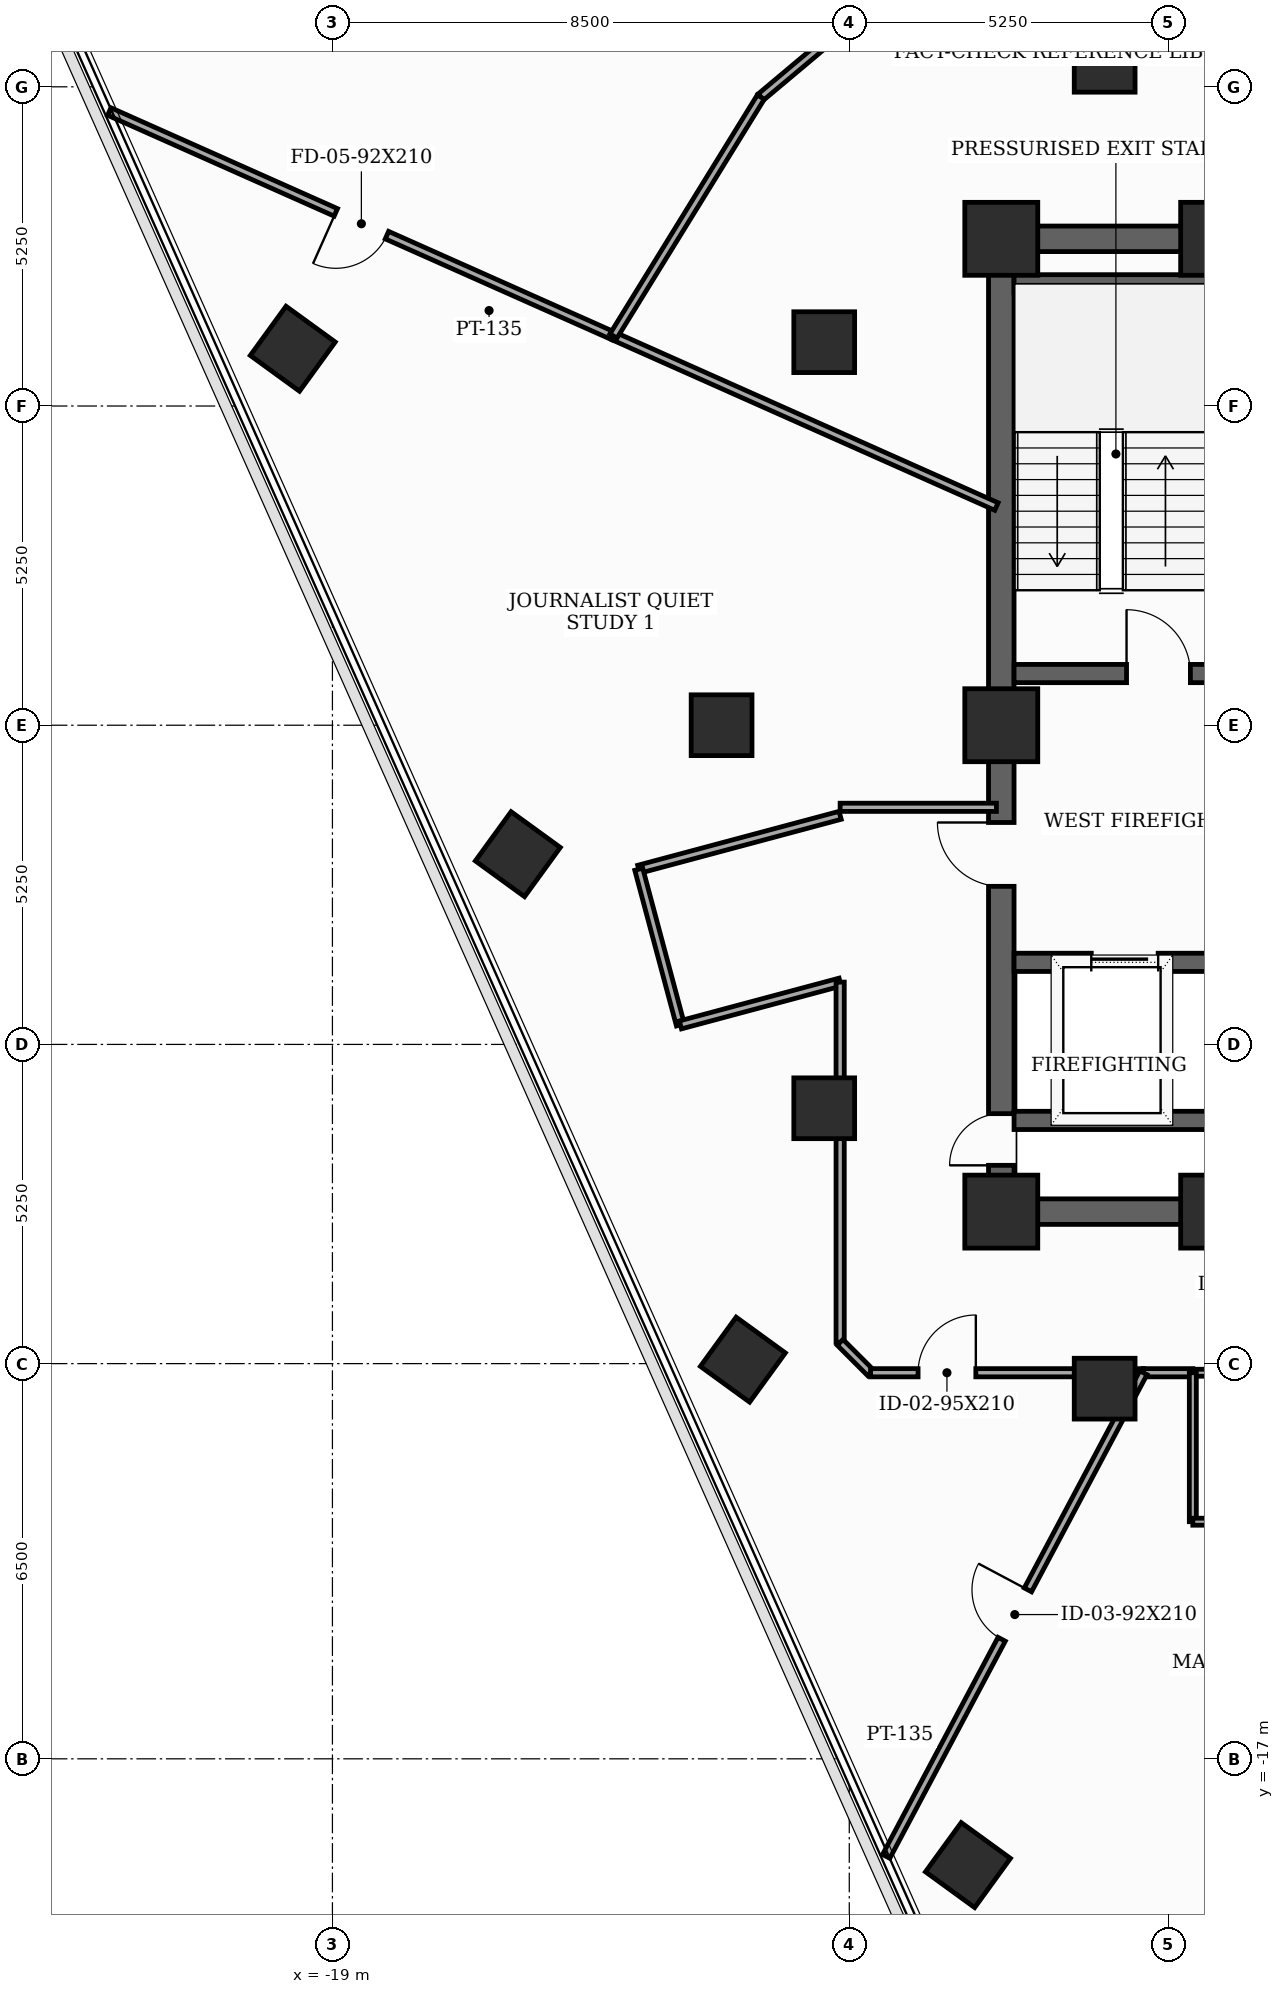
"""IFC4 building model, lengths in metres.
Left out: names, types, materials, properties, quantities, classifications, styles, units other than length and angle.
Written with IfcOpenShell. Run it as: python <this file> out.ifc"""

import sys

from ifc_helpers import new_model, si_unit, direction, frame, frame_2d, origin, origin_2d, place, context, subcontext, project, spatial, rectangle, extrude, element, fill, save


model = new_model("IFC4")
c1 = context("Model", 3, precision=1e-05, world=origin(), true_north=direction((0.0, 1.0)))
c2 = subcontext(c1, "Body", "Model", "MODEL_VIEW")
j1 = project(units=[si_unit("LENGTHUNIT", "METRE"), si_unit("PLANEANGLEUNIT", "RADIAN")], contexts=[c1])
p1 = place(None, origin())
s1 = spatial("IfcSite", under=j1, at=p1, CompositionType="ELEMENT")
p2 = place(p1, origin())
s2 = spatial("IfcBuilding", under=s1, at=p2, CompositionType="ELEMENT")
p3 = place(p2, frame((0.0, 0.0, 233.7)))
s3 = spatial("IfcBuildingStorey", under=s2, at=p3, CompositionType="ELEMENT", Elevation=233.7)
for number, where, z_axis, x_axis in (
    (1, (-8.0, -8.0, 0.0), (0.0, 0.0, 1.0), (1.0, 0.0, 0.0)),
    (2, (-4.45, -8.0, 0.0), (0.0, 0.0, 1.0), (1.0, 0.0, 0.0)),
    (3, (-4.45, 8.0, 0.0), (0.0, 0.0, 1.0), (1.0, 0.0, 0.0)),
    (4, (-8.0, 8.0, 0.0), (0.0, 0.0, 1.0), (1.0, 0.0, 0.0)),
    (5, (-8.0, 0.0, 0.0), (0.0, 0.0, 1.0), (1.0, 0.0, 0.0)),
):
    element("IfcColumn", number, at=place(p3, frame(where, z_axis=z_axis, x_axis=x_axis)), inside=s3, PredefinedType="COLUMN", context=c2, shape_type="SweptSolid", body=[
        extrude(rectangle(XDim=1.2, YDim=1.2, at=origin_2d()), origin(), (0.0, 0.0, 1.0), 3.7),
    ])
for number, where, z_axis, x_axis in (
    (6, (-6.3, 10.912, 0.0), (0.0, 0.0, 1.0), (1.0, 0.0, 0.0)),
    (7, (-10.912, 6.3, 0.0), (0.0, 0.0, 1.0), (1.0, 0.0, 0.0)),
    (8, (-12.6, 0.0, 0.0), (0.0, 0.0, 1.0), (1.0, 0.0, 0.0)),
    (9, (-10.912, -6.3, 0.0), (0.0, 0.0, 1.0), (1.0, 0.0, 0.0)),
    (10, (-6.3, -10.912, 0.0), (0.0, 0.0, 1.0), (1.0, 0.0, 0.0)),
    (11, (-19.652, 6.192, 0.0), (0.0, 0.0, 1.0), (0.588, 0.809, 0.0)),
    (12, (-15.951, -2.121, 0.0), (0.0, 0.0, 1.0), (0.588, 0.809, 0.0)),
    (13, (-12.25, -10.435, 0.0), (0.0, 0.0, 1.0), (0.588, 0.809, 0.0)),
    (14, (-8.548, -18.748, 0.0), (0.0, 0.0, 1.0), (0.588, 0.809, 0.0)),
):
    element("IfcColumn", number, at=place(p3, frame(where, z_axis=z_axis, x_axis=x_axis)), inside=s3, PredefinedType="COLUMN", context=c2, shape_type="SweptSolid", body=[
        extrude(rectangle(XDim=1.0, YDim=1.0, at=origin_2d()), origin(), (0.0, 0.0, 1.0), 3.7),
    ])
p4 = place(p3, frame((-8.0, -8.0, 0.0), z_axis=(0.0, 0.0, 1.0), x_axis=(0.0, 1.0, 0.0)))
e15 = element("IfcWall", 15, at=p4, inside=s3, PredefinedType="SHEAR", context=c2, shape_type="SweptSolid", body=[
    extrude(rectangle(XDim=16.0, YDim=0.42, at=frame_2d((8.0, 0.0))), origin(), (0.0, 0.0, 1.0), 3.5),
])
p5 = place(p4, frame((0.761, 0.0, 0.0)))
e16 = element("IfcOpeningElement", 16, at=p5, cuts=e15, PredefinedType="OPENING", context=c2, shape_type="SweptSolid", body=[
    extrude(rectangle(XDim=0.85, YDim=2.02, at=frame_2d((0.425, 1.01))), frame((0.0, 0.22, 0.0), z_axis=(0.0, -1.0, 0.0), x_axis=(1.0, 0.0, 0.0)), (0.0, 0.0, 1.0), 0.44),
])
p6 = place(p4, frame((5.35, 0.0, 0.0)))
e17 = element("IfcOpeningElement", 17, at=p6, cuts=e15, PredefinedType="OPENING", context=c2, shape_type="SweptSolid", body=[
    extrude(rectangle(XDim=1.05, YDim=2.15, at=frame_2d((0.525, 1.075))), frame((0.0, 0.22, 0.0), z_axis=(0.0, -1.0, 0.0), x_axis=(1.0, 0.0, 0.0)), (0.0, 0.0, 1.0), 0.44),
])
p7 = place(p3, frame((-8.0, -8.0, 0.0), z_axis=(0.0, 0.0, 1.0), x_axis=(1.0, 0.0, 0.0)))
e18 = element("IfcWall", 18, at=p7, inside=s3, PredefinedType="SHEAR", context=c2, shape_type="SweptSolid", body=[
    extrude(rectangle(XDim=16.0, YDim=0.42, at=frame_2d((8.0, 0.0))), origin(), (0.0, 0.0, 1.0), 3.5),
])
p8 = place(p7, frame((4.6, 0.0, 0.0)))
e19 = element("IfcOpeningElement", 19, at=p8, cuts=e18, PredefinedType="OPENING", context=c2, shape_type="SweptSolid", body=[
    extrude(rectangle(XDim=0.95, YDim=2.1, at=frame_2d((0.475, 1.05))), frame((0.0, 0.22, 0.0), z_axis=(0.0, -1.0, 0.0), x_axis=(1.0, 0.0, 0.0)), (0.0, 0.0, 1.0), 0.44),
])
p9 = place(p7, frame((7.52, 0.0, 0.0)))
e20 = element("IfcOpeningElement", 20, at=p9, cuts=e18, PredefinedType="OPENING", context=c2, shape_type="SweptSolid", body=[
    extrude(rectangle(XDim=0.95, YDim=2.1, at=frame_2d((0.475, 1.05))), frame((0.0, 0.22, 0.0), z_axis=(0.0, -1.0, 0.0), x_axis=(1.0, 0.0, 0.0)), (0.0, 0.0, 1.0), 0.44),
])
p10 = place(p7, frame((10.45, 0.0, 0.0)))
e21 = element("IfcOpeningElement", 21, at=p10, cuts=e18, PredefinedType="OPENING", context=c2, shape_type="SweptSolid", body=[
    extrude(rectangle(XDim=0.95, YDim=2.1, at=frame_2d((0.475, 1.05))), frame((0.0, 0.22, 0.0), z_axis=(0.0, -1.0, 0.0), x_axis=(1.0, 0.0, 0.0)), (0.0, 0.0, 1.0), 0.44),
])
p11 = place(p3, frame((-8.0, 8.0, 0.0), z_axis=(0.0, 0.0, 1.0), x_axis=(1.0, 0.0, 0.0)))
e22 = element("IfcWall", 22, at=p11, inside=s3, PredefinedType="SHEAR", context=c2, shape_type="SweptSolid", body=[
    extrude(rectangle(XDim=16.0, YDim=0.42, at=frame_2d((8.0, 0.0))), origin(), (0.0, 0.0, 1.0), 3.5),
])
p12 = place(p11, frame((7.1, 0.0, 0.0)))
e23 = element("IfcOpeningElement", 23, at=p12, cuts=e22, PredefinedType="OPENING", context=c2, shape_type="SweptSolid", body=[
    extrude(rectangle(XDim=1.8, YDim=2.15, at=frame_2d((0.9, 1.075))), frame((0.0, 0.22, 0.0), z_axis=(0.0, -1.0, 0.0), x_axis=(1.0, 0.0, 0.0)), (0.0, 0.0, 1.0), 0.44),
])
p13 = place(p3, frame((-7.79, 0.85, 0.0), z_axis=(0.0, 0.0, 1.0), x_axis=(1.0, 0.0, 0.0)))
e24 = element("IfcWall", 24, at=p13, inside=s3, PredefinedType="SHEAR", context=c2, shape_type="SweptSolid", body=[
    extrude(rectangle(XDim=3.34, YDim=0.3, at=frame_2d((1.67, 0.0))), origin(), (0.0, 0.0, 1.0), 3.5),
])
p14 = place(p13, frame((1.85, 0.0, 0.0)))
e25 = element("IfcOpeningElement", 25, at=p14, cuts=e24, PredefinedType="OPENING", context=c2, shape_type="SweptSolid", body=[
    extrude(rectangle(XDim=1.05, YDim=2.15, at=frame_2d((0.525, 1.075))), frame((0.0, 0.16, 0.0), z_axis=(0.0, -1.0, 0.0), x_axis=(1.0, 0.0, 0.0)), (0.0, 0.0, 1.0), 0.32),
])
p15 = place(p3, frame((-7.79, 7.26, 0.0), z_axis=(0.0, 0.0, 1.0), x_axis=(1.0, 0.0, 0.0)))
e26 = element("IfcWall", 26, at=p15, inside=s3, PredefinedType="SHEAR", context=c2, shape_type="SweptSolid", body=[
    extrude(rectangle(XDim=3.34, YDim=0.3, at=frame_2d((1.67, 0.0))), origin(), (0.0, 0.0, 1.0), 3.5),
])
p16 = place(p3, frame((-7.79, -3.9, 0.0), z_axis=(0.0, 0.0, 1.0), x_axis=(1.0, 0.0, 0.0)))
e27 = element("IfcWall", 27, at=p16, inside=s3, PredefinedType="SHEAR", context=c2, shape_type="SweptSolid", body=[
    extrude(rectangle(XDim=3.34, YDim=0.3, at=frame_2d((1.67, 0.0))), origin(), (0.0, 0.0, 1.0), 3.5),
])
p17 = place(p16, frame((1.27, 0.0, 0.0)))
e28 = element("IfcOpeningElement", 28, at=p17, cuts=e27, PredefinedType="OPENING", context=c2, shape_type="SweptSolid", body=[
    extrude(rectangle(XDim=1.1, YDim=2.1, at=frame_2d((0.55, 1.05))), frame((0.0, 0.16, 0.0), z_axis=(0.0, -1.0, 0.0), x_axis=(1.0, 0.0, 0.0)), (0.0, 0.0, 1.0), 0.32),
])
p18 = place(p3, frame((-7.79, -6.5, 0.0), z_axis=(0.0, 0.0, 1.0), x_axis=(1.0, 0.0, 0.0)))
e29 = element("IfcWall", 29, at=p18, inside=s3, PredefinedType="SHEAR", context=c2, shape_type="SweptSolid", body=[
    extrude(rectangle(XDim=3.34, YDim=0.3, at=frame_2d((1.67, 0.0))), origin(), (0.0, 0.0, 1.0), 3.5),
])
p19 = place(p3, frame((-8.08, -1.35, 0.0), z_axis=(0.0, 0.0, 1.0), x_axis=(-1.0, 0.0, 0.0)))
e30 = element("IfcWall", 30, at=p19, inside=s3, PredefinedType="PARTITIONING", context=c2, shape_type="SweptSolid", body=[
    extrude(rectangle(XDim=2.57, YDim=0.135, at=frame_2d((1.285, 0.0))), origin(), (0.0, 0.0, 1.0), 2.885),
])
p20 = place(p3, frame((-10.65, -1.482, 0.0), z_axis=(0.0, 0.0, 1.0), x_axis=(-0.965961397105, -0.2586862565, 0.0)))
e31 = element("IfcWall", 31, at=p20, inside=s3, PredefinedType="PARTITIONING", context=c2, shape_type="SweptSolid", body=[
    extrude(rectangle(XDim=3.429, YDim=0.135, at=frame_2d((1.714, 0.0))), origin(), (0.0, 0.0, 1.0), 2.885),
])
p21 = place(p3, frame((-13.962, -2.369, 0.0), z_axis=(0.0, 0.0, 1.0), x_axis=(0.258413725385, -0.966034340245, 0.0)))
e32 = element("IfcWall", 32, at=p21, inside=s3, PredefinedType="PARTITIONING", context=c2, shape_type="SweptSolid", body=[
    extrude(rectangle(XDim=2.65, YDim=0.135, at=frame_2d((1.325, 0.0))), origin(), (0.0, 0.0, 1.0), 3.5),
])
p22 = place(p3, frame((-13.277, -4.929, 0.0), z_axis=(0.0, 0.0, 1.0), x_axis=(0.965934830229, 0.258785439601, 0.0)))
e33 = element("IfcWall", 33, at=p22, inside=s3, PredefinedType="PARTITIONING", context=c2, shape_type="SweptSolid", body=[
    extrude(rectangle(XDim=2.72, YDim=0.135, at=frame_2d((1.36, 0.0))), origin(), (0.0, 0.0, 1.0), 2.885),
])
p23 = place(p3, frame((-10.65, -4.225, 0.0), z_axis=(0.0, 0.0, 1.0), x_axis=(0.0, -1.0, 0.0)))
e34 = element("IfcWall", 34, at=p23, inside=s3, PredefinedType="PARTITIONING", context=c2, shape_type="SweptSolid", body=[
    extrude(rectangle(XDim=5.925, YDim=0.135, at=frame_2d((2.962, 0.0))), origin(), (0.0, 0.0, 1.0), 2.885),
])
p24 = place(p3, frame((-10.65, -10.15, 0.0), z_axis=(0.0, 0.0, 1.0), x_axis=(0.707106781187, -0.707106781187, 0.0)))
e35 = element("IfcWall", 35, at=p24, inside=s3, PredefinedType="PARTITIONING", context=c2, shape_type="SweptSolid", body=[
    extrude(rectangle(XDim=0.707, YDim=0.135, at=frame_2d((0.354, 0.0))), origin(), (0.0, 0.0, 1.0), 3.5),
])
p25 = place(p3, frame((-10.15, -10.65, 0.0), z_axis=(0.0, 0.0, 1.0), x_axis=(1.0, 0.0, 0.0)))
e36 = element("IfcWall", 36, at=p25, inside=s3, PredefinedType="PARTITIONING", context=c2, shape_type="SweptSolid", body=[
    extrude(rectangle(XDim=4.487, YDim=0.135, at=frame_2d((2.243, 0.0))), origin(), (0.0, 0.0, 1.0), 2.885),
])
p26 = place(p25, frame((0.781, 0.0, 0.0)))
e37 = element("IfcOpeningElement", 37, at=p26, cuts=e36, PredefinedType="OPENING", context=c2, shape_type="SweptSolid", body=[
    extrude(rectangle(XDim=0.95, YDim=2.1, at=frame_2d((0.475, 1.05))), frame((0.0, 0.077, 0.0), z_axis=(0.0, -1.0, 0.0), x_axis=(1.0, 0.0, 0.0)), (0.0, 0.0, 1.0), 0.155),
])
p27 = place(p3, frame((-4.85, -10.65, 0.0), z_axis=(0.0, 0.0, 1.0), x_axis=(1.0, 0.0, 0.0)))
e38 = element("IfcWall", 38, at=p27, inside=s3, PredefinedType="PARTITIONING", context=c2, shape_type="SweptSolid", body=[
    extrude(rectangle(XDim=2.4, YDim=0.115, at=frame_2d((1.2, 0.0))), origin(), (0.0, 0.0, 1.0), 3.5),
])
p28 = place(p27, frame((0.74, 0.0, 0.0)))
e39 = element("IfcOpeningElement", 39, at=p28, cuts=e38, PredefinedType="OPENING", context=c2, shape_type="SweptSolid", body=[
    extrude(rectangle(XDim=0.92, YDim=2.1, at=frame_2d((0.46, 1.05))), frame((0.0, 0.067, 0.0), z_axis=(0.0, -1.0, 0.0), x_axis=(1.0, 0.0, 0.0)), (0.0, 0.0, 1.0), 0.135),
])
p29 = place(p3, frame((-5.663, -10.65, 0.0), z_axis=(0.0, 0.0, 1.0), x_axis=(1.0, 0.0, 0.0)))
e40 = element("IfcWall", 40, at=p29, inside=s3, PredefinedType="PARTITIONING", context=c2, shape_type="SweptSolid", body=[
    extrude(rectangle(XDim=0.813, YDim=0.135, at=frame_2d((0.406, 0.0))), origin(), (0.0, 0.0, 1.0), 3.5),
])
p30 = place(p3, frame((-9.893, -18.605, 0.0), z_axis=(0.0, 0.0, 1.0), x_axis=(0.469478145305, 0.88294409284, 0.0)))
e41 = element("IfcWall", 41, at=p30, inside=s3, PredefinedType="PARTITIONING", context=c2, shape_type="SweptSolid", body=[
    extrude(rectangle(XDim=9.01, YDim=0.135, at=frame_2d((4.505, 0.0))), origin(), (0.0, 0.0, 1.0), 2.885),
])
p31 = place(p30, frame((4.045, 0.0, 0.0)))
e42 = element("IfcOpeningElement", 42, at=p31, cuts=e41, PredefinedType="OPENING", context=c2, shape_type="SweptSolid", body=[
    extrude(rectangle(XDim=0.92, YDim=2.1, at=frame_2d((0.46, 1.05))), frame((0.0, 0.077, 0.0), z_axis=(0.0, -1.0, 0.0), x_axis=(1.0, 0.0, 0.0)), (0.0, 0.0, 1.0), 0.155),
])
p32 = place(p3, frame((-8.08, 3.597, 0.0), z_axis=(0.0, 0.0, 1.0), x_axis=(-0.913494385598, 0.40685133339, 0.0)))
e43 = element("IfcWall", 43, at=p32, inside=s3, PredefinedType="PARTITIONING", context=c2, shape_type="SweptSolid", body=[
    extrude(rectangle(XDim=6.894, YDim=0.135, at=frame_2d((3.447, 0.0))), origin(), (0.0, 0.0, 1.0), 2.885),
])
p33 = place(p3, frame((-14.378, 6.402, 0.0), z_axis=(0.0, 0.0, 1.0), x_axis=(-0.913562917951, 0.406697424315, 0.0)))
e44 = element("IfcWall", 44, at=p33, inside=s3, PredefinedType="PARTITIONING", context=c2, shape_type="SweptSolid", body=[
    extrude(rectangle(XDim=9.077, YDim=0.135, at=frame_2d((4.538, 0.0))), origin(), (0.0, 0.0, 1.0), 2.985),
])
p34 = place(p33, frame((4.078, 0.0, 0.0)))
e45 = element("IfcOpeningElement", 45, at=p34, cuts=e44, PredefinedType="OPENING", context=c2, shape_type="SweptSolid", body=[
    extrude(rectangle(XDim=0.92, YDim=2.1, at=frame_2d((0.46, 1.05))), frame((0.0, 0.077, 0.0), z_axis=(0.0, -1.0, 0.0), x_axis=(1.0, 0.0, 0.0)), (0.0, 0.0, 1.0), 0.155),
])
p35 = place(p3, frame((-4.85, -10.65, 0.0), z_axis=(0.0, 0.0, 1.0), x_axis=(0.0, -1.0, 0.0)))
e46 = element("IfcWall", 46, at=p35, inside=s3, PredefinedType="PARTITIONING", context=c2, shape_type="SweptSolid", body=[
    extrude(rectangle(XDim=2.45, YDim=0.115, at=frame_2d((1.225, 0.0))), origin(), (0.0, 0.0, 1.0), 2.885),
])
p36 = place(p3, frame((-4.85, -13.1, 0.0), z_axis=(0.0, 0.0, 1.0), x_axis=(1.0, 0.0, 0.0)))
e47 = element("IfcWall", 47, at=p36, inside=s3, PredefinedType="PARTITIONING", context=c2, shape_type="SweptSolid", body=[
    extrude(rectangle(XDim=2.4, YDim=0.115, at=frame_2d((1.2, 0.0))), origin(), (0.0, 0.0, 1.0), 3.5),
])
p37 = place(p3, frame((-8.098, 13.567, 0.0), z_axis=(0.0, 0.0, 1.0), x_axis=(-0.766114520239, -0.642704085781, 0.0)))
e48 = element("IfcWall", 48, at=p37, inside=s3, PredefinedType="PARTITIONING", context=c2, shape_type="SweptSolid", body=[
    extrude(rectangle(XDim=5.035, YDim=0.135, at=frame_2d((2.517, 0.0))), origin(), (0.0, 0.0, 1.0), 2.985),
])
p38 = place(p3, frame((-11.955, 10.331, 0.0), z_axis=(0.0, 0.0, 1.0), x_axis=(-0.524888064347, -0.851171263557, 0.0)))
e49 = element("IfcWall", 49, at=p38, inside=s3, PredefinedType="PARTITIONING", context=c2, shape_type="SweptSolid", body=[
    extrude(rectangle(XDim=4.616, YDim=0.135, at=frame_2d((2.308, 0.0))), origin(), (0.0, 0.0, 1.0), 2.985),
])
p39 = place(p5, origin())
e50 = element("IfcDoor", 50, at=p39, inside=s3, OperationType="SINGLE_SWING_LEFT", PredefinedType="TRAPDOOR", context=c2, shape_type="SweptSolid", body=[
    extrude(rectangle(XDim=0.85, YDim=2.02, at=frame_2d((0.425, 1.01))), frame((0.0, 0.025, 0.0), z_axis=(0.0, -1.0, 0.0), x_axis=(1.0, 0.0, 0.0)), (0.0, 0.0, 1.0), 0.05),
])
fill(e16, e50)
p40 = place(p6, origin())
e51 = element("IfcDoor", 51, at=p40, inside=s3, OperationType="SINGLE_SWING_RIGHT", PredefinedType="DOOR", context=c2, shape_type="SweptSolid", body=[
    extrude(rectangle(XDim=1.05, YDim=2.15, at=frame_2d((0.525, 1.075))), frame((0.0, 0.025, 0.0), z_axis=(0.0, -1.0, 0.0), x_axis=(1.0, 0.0, 0.0)), (0.0, 0.0, 1.0), 0.05),
])
fill(e17, e51)
p41 = place(p14, origin())
e52 = element("IfcDoor", 52, at=p41, inside=s3, OperationType="SINGLE_SWING_LEFT", PredefinedType="DOOR", context=c2, shape_type="SweptSolid", body=[
    extrude(rectangle(XDim=1.05, YDim=2.15, at=frame_2d((0.525, 1.075))), frame((0.0, 0.025, 0.0), z_axis=(0.0, -1.0, 0.0), x_axis=(1.0, 0.0, 0.0)), (0.0, 0.0, 1.0), 0.05),
])
fill(e25, e52)
p42 = place(p17, origin())
e53 = element("IfcDoor", 53, at=p42, inside=s3, OperationType="SLIDING_TO_LEFT", PredefinedType="DOOR", context=c2, shape_type="SweptSolid", body=[
    extrude(rectangle(XDim=1.1, YDim=2.1, at=frame_2d((0.55, 1.05))), frame((0.0, 0.025, 0.0), z_axis=(0.0, -1.0, 0.0), x_axis=(1.0, 0.0, 0.0)), (0.0, 0.0, 1.0), 0.05),
])
fill(e28, e53)
p43 = place(p26, origin())
e54 = element("IfcDoor", 54, at=p43, inside=s3, OperationType="SINGLE_SWING_RIGHT", PredefinedType="DOOR", context=c2, shape_type="SweptSolid", body=[
    extrude(rectangle(XDim=0.95, YDim=2.1, at=frame_2d((0.475, 1.05))), frame((0.0, 0.025, 0.0), z_axis=(0.0, -1.0, 0.0), x_axis=(1.0, 0.0, 0.0)), (0.0, 0.0, 1.0), 0.05),
])
fill(e37, e54)
p44 = place(p31, origin())
e55 = element("IfcDoor", 55, at=p44, inside=s3, OperationType="SINGLE_SWING_RIGHT", PredefinedType="DOOR", context=c2, shape_type="SweptSolid", body=[
    extrude(rectangle(XDim=0.92, YDim=2.1, at=frame_2d((0.46, 1.05))), frame((0.0, 0.025, 0.0), z_axis=(0.0, -1.0, 0.0), x_axis=(1.0, 0.0, 0.0)), (0.0, 0.0, 1.0), 0.05),
])
fill(e42, e55)
p45 = place(p34, origin())
e56 = element("IfcDoor", 56, at=p45, inside=s3, OperationType="SINGLE_SWING_RIGHT", PredefinedType="DOOR", context=c2, shape_type="SweptSolid", body=[
    extrude(rectangle(XDim=0.92, YDim=2.1, at=frame_2d((0.46, 1.05))), frame((0.0, 0.025, 0.0), z_axis=(0.0, -1.0, 0.0), x_axis=(1.0, 0.0, 0.0)), (0.0, 0.0, 1.0), 0.05),
])
fill(e45, e56)
save(model, sys.argv[1])
